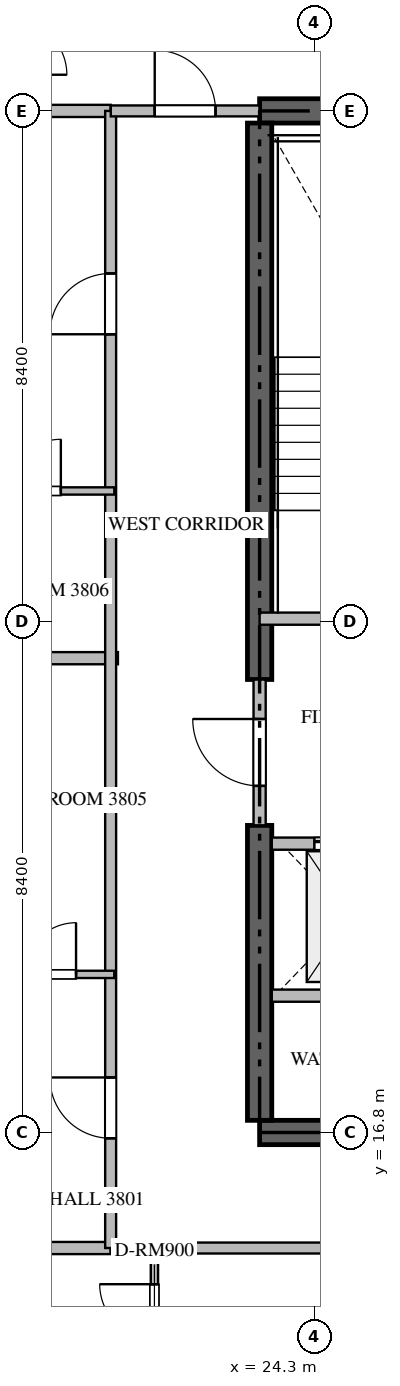
"""IFC4 building model, lengths in metres.
Left out: names, types, materials, properties, quantities, classifications, styles, units other than length and angle.
Written with IfcOpenShell. Run it as: python <this file> out.ifc"""

import sys

from ifc_helpers import new_model, si_unit, direction, frame, frame_2d, origin, place, context, subcontext, project, spatial, rectangle, extrude, source, transform, mapped, element, fill, save


model = new_model("IFC4")
c1 = context("Model", 3, precision=1e-05, world=origin(), true_north=direction((0.0, 1.0)))
c2 = subcontext(c1, "Body", "Model", "MODEL_VIEW")
j1 = project(units=[si_unit("LENGTHUNIT", "METRE"), si_unit("PLANEANGLEUNIT", "RADIAN")], contexts=[c1])
p1 = place(None, origin())
s1 = spatial("IfcSite", under=j1, at=p1, CompositionType="ELEMENT")
p2 = place(p1, origin())
s2 = spatial("IfcBuilding", under=s1, at=p2, CompositionType="ELEMENT")
p3 = place(p2, frame((0.0, 0.0, 153.9)))
s3 = spatial("IfcBuildingStorey", under=s2, at=p3, CompositionType="ELEMENT", Elevation=153.9)
for number, where, z_axis, x_axis in (
    (1, (23.4, 16.8, -0.26), (0.0, 0.0, 1.0), (1.0, 0.0, 0.0)),
    (2, (41.4, 33.6, -0.26), (0.0, 0.0, 1.0), (-1.0, 0.0, 0.0)),
):
    element("IfcWall", number, at=place(p3, frame(where, z_axis=z_axis, x_axis=x_axis)), inside=s3, PredefinedType="SHEAR", context=c2, shape_type="SweptSolid", body=[
        extrude(rectangle(XDim=18.0, YDim=0.4, at=frame_2d((9.0, 0.0))), origin(), (0.0, 0.0, 1.0), 3.748),
    ])
p4 = place(p3, frame((23.4, 17.0, -0.26), z_axis=(0.0, 0.0, 1.0), x_axis=(0.0, 1.0, 0.0)))
e3 = element("IfcWall", 3, at=p4, inside=s3, PredefinedType="SHEAR", context=c2, shape_type="SweptSolid", body=[
    extrude(rectangle(XDim=4.85, YDim=0.4, at=frame_2d((2.425, 0.0))), origin(), (0.0, 0.0, 1.0), 3.748),
])
p5 = place(p3, frame((23.4, 24.25, -0.26), z_axis=(0.0, 0.0, 1.0), x_axis=(0.0, 1.0, 0.0)))
e4 = element("IfcWall", 4, at=p5, inside=s3, PredefinedType="SHEAR", context=c2, shape_type="SweptSolid", body=[
    extrude(rectangle(XDim=9.15, YDim=0.4, at=frame_2d((4.575, 0.0))), origin(), (0.0, 0.0, 1.0), 3.748),
])
p6 = place(p3, frame((23.4, 25.25, 0.0), z_axis=(0.0, 0.0, 1.0), x_axis=(1.0, 0.0, 0.0)))
e5 = element("IfcWall", 5, at=p6, inside=s3, PredefinedType="STANDARD", context=c2, shape_type="SweptSolid", body=[
    extrude(rectangle(XDim=4.45, YDim=0.2, at=frame_2d((2.225, 0.0))), origin(), (0.0, 0.0, 1.0), 3.49),
])
p7 = place(p6, frame((1.65, 0.0, 0.0)))
e6 = element("IfcOpeningElement", 6, at=p7, cuts=e5, PredefinedType="OPENING", context=c2, shape_type="SweptSolid", body=[
    extrude(rectangle(XDim=1.1, YDim=2.15, at=frame_2d((0.55, 1.075))), frame((0.0, 0.11, 0.0), z_axis=(0.0, -1.0, 0.0), x_axis=(1.0, 0.0, 0.0)), (0.0, 0.0, 1.0), 0.22),
])
p8 = place(p3, frame((23.6, 21.55, 0.0), z_axis=(0.0, 0.0, 1.0), x_axis=(1.0, 0.0, 0.0)))
e7 = element("IfcWall", 7, at=p8, inside=s3, PredefinedType="STANDARD", context=c2, shape_type="SweptSolid", body=[
    extrude(rectangle(XDim=2.45, YDim=0.2, at=frame_2d((1.225, 0.0))), origin(), (0.0, 0.0, 1.0), 3.49),
])
p9 = place(p8, frame((0.7, 0.0, 0.0)))
e8 = element("IfcOpeningElement", 8, at=p9, cuts=e7, PredefinedType="OPENING", context=c2, shape_type="SweptSolid", body=[
    extrude(rectangle(XDim=1.2, YDim=2.2, at=frame_2d((0.6, 1.1))), frame((0.0, 0.11, 0.0), z_axis=(0.0, -1.0, 0.0), x_axis=(1.0, 0.0, 0.0)), (0.0, 0.0, 1.0), 0.22),
])
p10 = place(p3, frame((23.6, 19.05, 0.0), z_axis=(0.0, 0.0, 1.0), x_axis=(1.0, 0.0, 0.0)))
e9 = element("IfcWall", 9, at=p10, inside=s3, PredefinedType="STANDARD", context=c2, shape_type="SweptSolid", body=[
    extrude(rectangle(XDim=2.45, YDim=0.2, at=frame_2d((1.225, 0.0))), origin(), (0.0, 0.0, 1.0), 3.49),
])
p11 = place(p3, frame((23.4, 21.852, 0.0), z_axis=(0.0, 0.0, 1.0), x_axis=(0.0, 1.0, 0.0)))
e10 = element("IfcWall", 10, at=p11, inside=s3, PredefinedType="STANDARD", context=c2, shape_type="SweptSolid", body=[
    extrude(rectangle(XDim=2.396, YDim=0.2, at=frame_2d((1.198, 0.0))), origin(), (0.0, 0.0, 1.0), 3.49),
])
p12 = place(p11, frame((0.648, 0.0, 0.0)))
e11 = element("IfcOpeningElement", 11, at=p12, cuts=e10, PredefinedType="OPENING", context=c2, shape_type="SweptSolid", body=[
    extrude(rectangle(XDim=1.1, YDim=2.15, at=frame_2d((0.55, 1.075))), frame((0.0, 0.11, 0.0), z_axis=(0.0, -1.0, 0.0), x_axis=(1.0, 0.0, 0.0)), (0.0, 0.0, 1.0), 0.22),
])
p13 = place(p3, frame((7.882, 24.6, 0.0), z_axis=(0.0, 0.0, 1.0), x_axis=(1.0, 0.0, 0.0)))
e12 = element("IfcWall", 12, at=p13, inside=s3, PredefinedType="PARTITIONING", context=c2, shape_type="SweptSolid", body=[
    extrude(rectangle(XDim=13.188, YDim=0.2, at=frame_2d((6.594, 0.0))), origin(), (0.0, 0.0, 1.0), 3.49),
])
for number, where, z_axis, x_axis in (
    (13, (7.882, 14.9, 0.0), (0.0, 0.0, 1.0), (1.0, 0.0, 0.0)),
    (14, (7.882, 33.6, 0.0), (0.0, 0.0, 1.0), (1.0, 0.0, 0.0)),
):
    element("IfcWall", number, at=place(p3, frame(where, z_axis=z_axis, x_axis=x_axis)), inside=s3, PredefinedType="PARTITIONING", context=c2, shape_type="SweptSolid", body=[
        extrude(rectangle(XDim=13.068, YDim=0.2, at=frame_2d((6.534, 0.0))), origin(), (0.0, 0.0, 1.0), 3.49),
    ])
p14 = place(p3, frame((20.952, 14.9, 0.0), z_axis=(0.0, 0.0, 1.0), x_axis=(1.0, 0.0, 0.0)))
e15 = element("IfcWall", 15, at=p14, inside=s3, PredefinedType="PARTITIONING", context=c2, shape_type="SweptSolid", body=[
    extrude(rectangle(XDim=22.896, YDim=0.18, at=frame_2d((11.448, 0.0))), origin(), (0.0, 0.0, 1.0), 3.49),
])
p15 = place(p14, frame((5.934, 0.0, 0.0)))
e16 = element("IfcOpeningElement", 16, at=p15, cuts=e15, PredefinedType="OPENING", context=c2, shape_type="SweptSolid", body=[
    extrude(rectangle(XDim=1.0, YDim=2.15, at=frame_2d((0.5, 1.075))), frame((0.0, 0.1, 0.0), z_axis=(0.0, -1.0, 0.0), x_axis=(1.0, 0.0, 0.0)), (0.0, 0.0, 1.0), 0.2),
])
p16 = place(p14, frame((16.51, 0.0, 0.0)))
e17 = element("IfcOpeningElement", 17, at=p16, cuts=e15, PredefinedType="OPENING", context=c2, shape_type="SweptSolid", body=[
    extrude(rectangle(XDim=1.0, YDim=2.15, at=frame_2d((0.5, 1.075))), frame((0.0, 0.1, 0.0), z_axis=(0.0, -1.0, 0.0), x_axis=(1.0, 0.0, 0.0)), (0.0, 0.0, 1.0), 0.2),
])
p17 = place(p3, frame((20.95, 14.9, 0.0), z_axis=(0.0, 0.0, 1.0), x_axis=(0.0, 1.0, 0.0)))
e18 = element("IfcWall", 18, at=p17, inside=s3, PredefinedType="PARTITIONING", context=c2, shape_type="SweptSolid", body=[
    extrude(rectangle(XDim=18.7, YDim=0.18, at=frame_2d((9.35, 0.0))), origin(), (0.0, 0.0, 1.0), 3.49),
])
p18 = place(p17, frame((1.805, 0.0, 0.0)))
e19 = element("IfcOpeningElement", 19, at=p18, cuts=e18, PredefinedType="OPENING", context=c2, shape_type="SweptSolid", body=[
    extrude(rectangle(XDim=1.0, YDim=2.15, at=frame_2d((0.5, 1.075))), frame((0.0, 0.1, 0.0), z_axis=(0.0, -1.0, 0.0), x_axis=(1.0, 0.0, 0.0)), (0.0, 0.0, 1.0), 0.2),
])
p19 = place(p17, frame((15.027, 0.0, 0.0)))
e20 = element("IfcOpeningElement", 20, at=p19, cuts=e18, PredefinedType="OPENING", context=c2, shape_type="SweptSolid", body=[
    extrude(rectangle(XDim=1.0, YDim=2.15, at=frame_2d((0.5, 1.075))), frame((0.0, 0.1, 0.0), z_axis=(0.0, -1.0, 0.0), x_axis=(1.0, 0.0, 0.0)), (0.0, 0.0, 1.0), 0.2),
])
p20 = place(p3, frame((20.952, 33.6, 0.0), z_axis=(0.0, 0.0, 1.0), x_axis=(1.0, 0.0, 0.0)))
e21 = element("IfcWall", 21, at=p20, inside=s3, PredefinedType="PARTITIONING", context=c2, shape_type="SweptSolid", body=[
    extrude(rectangle(XDim=2.446, YDim=0.18, at=frame_2d((1.223, 0.0))), origin(), (0.0, 0.0, 1.0), 3.49),
])
p21 = place(p20, frame((0.723, 0.0, 0.0)))
e22 = element("IfcOpeningElement", 22, at=p21, cuts=e21, PredefinedType="OPENING", context=c2, shape_type="SweptSolid", body=[
    extrude(rectangle(XDim=1.0, YDim=2.15, at=frame_2d((0.5, 1.075))), frame((0.0, 0.1, 0.0), z_axis=(0.0, -1.0, 0.0), x_axis=(1.0, 0.0, 0.0)), (0.0, 0.0, 1.0), 0.2),
])
p22 = place(p3, frame((21.67, 12.75, 0.0), z_axis=(0.0, 0.0, 1.0), x_axis=(0.0, 1.0, 0.0)))
e23 = element("IfcWall", 23, at=p22, inside=s3, PredefinedType="PARTITIONING", context=c2, shape_type="SweptSolid", body=[
    extrude(rectangle(XDim=2.21, YDim=0.12, at=frame_2d((1.105, 0.0))), origin(), (0.0, 0.0, 1.0), 3.49),
])
p23 = place(p22, frame((0.655, 0.0, 0.0)))
e24 = element("IfcOpeningElement", 24, at=p23, cuts=e23, PredefinedType="OPENING", context=c2, shape_type="SweptSolid", body=[
    extrude(rectangle(XDim=0.9, YDim=2.1, at=frame_2d((0.45, 1.05))), frame((0.0, 0.07, 0.0), z_axis=(0.0, -1.0, 0.0), x_axis=(1.0, 0.0, 0.0)), (0.0, 0.0, 1.0), 0.14),
])
p24 = place(p3, frame((18.902, 19.4, 0.0), z_axis=(0.0, 0.0, 1.0), x_axis=(1.0, 0.0, 0.0)))
e25 = element("IfcWall", 25, at=p24, inside=s3, PredefinedType="PARTITIONING", context=c2, shape_type="SweptSolid", body=[
    extrude(rectangle(XDim=2.108, YDim=0.12, at=frame_2d((1.054, 0.0))), origin(), (0.0, 0.0, 1.0), 3.49),
])
p25 = place(p24, frame((0.629, 0.0, 0.0)))
e26 = element("IfcOpeningElement", 26, at=p25, cuts=e25, PredefinedType="OPENING", context=c2, shape_type="SweptSolid", body=[
    extrude(rectangle(XDim=0.85, YDim=2.1, at=frame_2d((0.425, 1.05))), frame((0.0, 0.07, 0.0), z_axis=(0.0, -1.0, 0.0), x_axis=(1.0, 0.0, 0.0)), (0.0, 0.0, 1.0), 0.14),
])
p26 = place(p3, frame((18.402, 27.35, 0.0), z_axis=(0.0, 0.0, 1.0), x_axis=(1.0, 0.0, 0.0)))
e27 = element("IfcWall", 27, at=p26, inside=s3, PredefinedType="PARTITIONING", context=c2, shape_type="SweptSolid", body=[
    extrude(rectangle(XDim=2.608, YDim=0.12, at=frame_2d((1.304, 0.0))), origin(), (0.0, 0.0, 1.0), 3.49),
])
p27 = place(p26, frame((0.879, 0.0, 0.0)))
e28 = element("IfcOpeningElement", 28, at=p27, cuts=e27, PredefinedType="OPENING", context=c2, shape_type="SweptSolid", body=[
    extrude(rectangle(XDim=0.85, YDim=2.1, at=frame_2d((0.425, 1.05))), frame((0.0, 0.07, 0.0), z_axis=(0.0, -1.0, 0.0), x_axis=(1.0, 0.0, 0.0)), (0.0, 0.0, 1.0), 0.14),
])
m1 = source(origin(), c2, "Body", "SweptSolid", [
    extrude(rectangle(XDim=1.2, YDim=2.2, at=frame_2d((0.6, 1.1))), frame((0.0, 0.025, 0.0), z_axis=(0.0, -1.0, 0.0), x_axis=(1.0, 0.0, 0.0)), (0.0, 0.0, 1.0), 0.05),
])
p28 = place(p9, origin())
e29 = element("IfcDoor", 29, at=p28, inside=s3, OperationType="DOUBLE_DOOR_SLIDING", PredefinedType="DOOR", context=c2, shape_type="MappedRepresentation", body=[
    mapped(m1, transform((0.0, 0.0, 0.0), scale=1.0)),
])
fill(e8, e29)
m2 = source(origin(), c2, "Body", "SweptSolid", [
    extrude(rectangle(XDim=1.1, YDim=2.15, at=frame_2d((0.55, 1.075))), frame((0.0, 0.025, 0.0), z_axis=(0.0, -1.0, 0.0), x_axis=(1.0, 0.0, 0.0)), (0.0, 0.0, 1.0), 0.05),
])
p29 = place(p12, origin())
e30 = element("IfcDoor", 30, at=p29, inside=s3, OperationType="SINGLE_SWING_RIGHT", PredefinedType="DOOR", context=c2, shape_type="MappedRepresentation", body=[
    mapped(m2, transform((0.0, 0.0, 0.0), scale=1.0)),
])
fill(e11, e30)
m3 = source(origin(), c2, "Body", "SweptSolid", [
    extrude(rectangle(XDim=1.0, YDim=2.15, at=frame_2d((0.5, 1.075))), frame((0.0, 0.025, 0.0), z_axis=(0.0, -1.0, 0.0), x_axis=(1.0, 0.0, 0.0)), (0.0, 0.0, 1.0), 0.05),
])
p30 = place(p18, origin())
e31 = element("IfcDoor", 31, at=p30, inside=s3, OperationType="SINGLE_SWING_RIGHT", PredefinedType="DOOR", context=c2, shape_type="MappedRepresentation", body=[
    mapped(m3, transform((0.0, 0.0, 0.0), scale=1.0)),
])
fill(e19, e31)
p31 = place(p19, origin())
e32 = element("IfcDoor", 32, at=p31, inside=s3, OperationType="SINGLE_SWING_LEFT", PredefinedType="DOOR", context=c2, shape_type="MappedRepresentation", body=[
    mapped(m3, transform((0.0, 0.0, 0.0), scale=1.0)),
])
fill(e20, e32)
p32 = place(p21, origin())
e33 = element("IfcDoor", 33, at=p32, inside=s3, OperationType="SINGLE_SWING_LEFT", PredefinedType="DOOR", context=c2, shape_type="MappedRepresentation", body=[
    mapped(m3, transform((0.0, 0.0, 0.0), scale=1.0)),
])
fill(e22, e33)
m4 = source(origin(), c2, "Body", "SweptSolid", [
    extrude(rectangle(XDim=0.9, YDim=2.1, at=frame_2d((0.45, 1.05))), frame((0.0, 0.025, 0.0), z_axis=(0.0, -1.0, 0.0), x_axis=(1.0, 0.0, 0.0)), (0.0, 0.0, 1.0), 0.05),
])
p33 = place(p23, origin())
e34 = element("IfcDoor", 34, at=p33, inside=s3, OperationType="SINGLE_SWING_RIGHT", PredefinedType="DOOR", context=c2, shape_type="MappedRepresentation", body=[
    mapped(m4, transform((0.0, 0.0, 0.0), scale=1.0)),
])
fill(e24, e34)
m5 = source(origin(), c2, "Body", "SweptSolid", [
    extrude(rectangle(XDim=0.85, YDim=2.1, at=frame_2d((0.425, 1.05))), frame((0.0, 0.025, 0.0), z_axis=(0.0, -1.0, 0.0), x_axis=(1.0, 0.0, 0.0)), (0.0, 0.0, 1.0), 0.05),
])
p34 = place(p25, origin())
e35 = element("IfcDoor", 35, at=p34, inside=s3, OperationType="SINGLE_SWING_RIGHT", PredefinedType="DOOR", context=c2, shape_type="MappedRepresentation", body=[
    mapped(m5, transform((0.0, 0.0, 0.0), scale=1.0)),
])
fill(e26, e35)
p35 = place(p27, origin())
e36 = element("IfcDoor", 36, at=p35, inside=s3, OperationType="SINGLE_SWING_RIGHT", PredefinedType="DOOR", context=c2, shape_type="MappedRepresentation", body=[
    mapped(m5, transform((0.0, 0.0, 0.0), scale=1.0)),
])
fill(e28, e36)
save(model, sys.argv[1])
